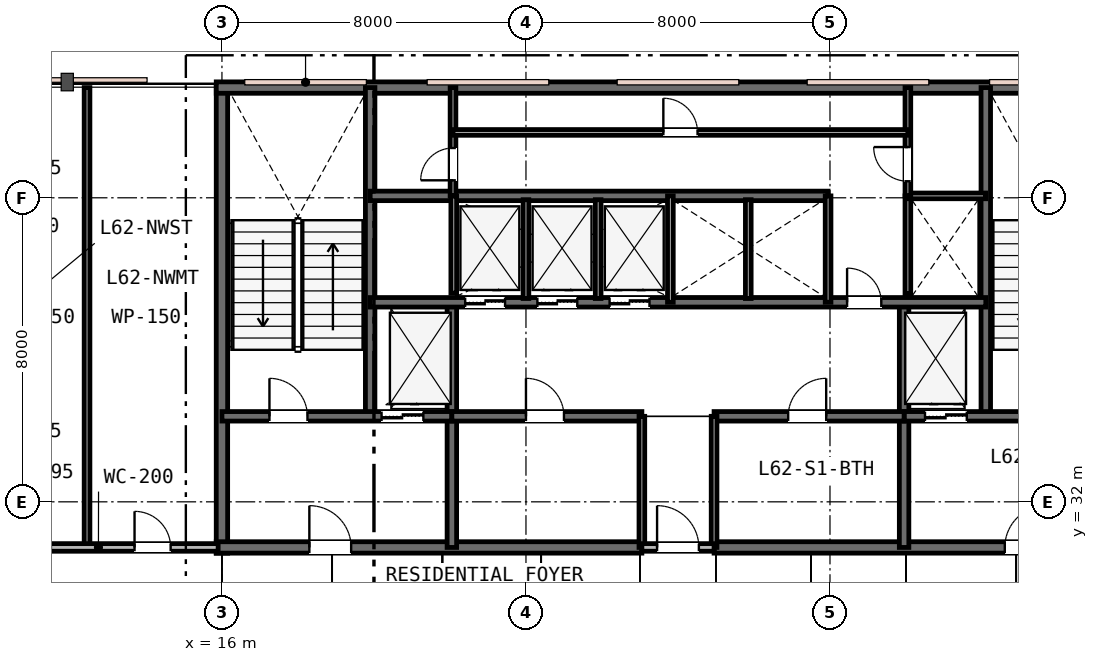
"""IFC4 building model, lengths in metres.
Left out: names, types, materials, properties, quantities, classifications, styles, units other than length and angle.
Written with IfcOpenShell. Run it as: python <this file> out.ifc"""

import sys

from ifc_helpers import new_model, si_unit, direction, frame, frame_2d, origin, place, context, subcontext, project, spatial, rectangle, extrude, element, fill, save


model = new_model("IFC4")
c1 = context("Model", 3, precision=1e-05, world=origin(), true_north=direction((0.0, 1.0)))
c2 = subcontext(c1, "Body", "Model", "MODEL_VIEW")
j1 = project(units=[si_unit("LENGTHUNIT", "METRE"), si_unit("PLANEANGLEUNIT", "RADIAN")], contexts=[c1])
p1 = place(None, origin())
s1 = spatial("IfcSite", under=j1, at=p1, CompositionType="ELEMENT")
p2 = place(p1, origin())
s2 = spatial("IfcBuilding", under=s1, at=p2, CompositionType="ELEMENT")
p3 = place(p2, frame((0.0, 0.0, 241.2)))
s3 = spatial("IfcBuildingStorey", under=s2, at=p3, CompositionType="ELEMENT", Elevation=241.2)
p4 = place(p3, frame((16.0, 30.65, 0.0), z_axis=(0.0, 0.0, 1.0), x_axis=(0.0, 1.0, 0.0)))
e1 = element("IfcWall", 1, at=p4, inside=s3, PredefinedType="SHEAR", context=c2, shape_type="SweptSolid", body=[
    extrude(rectangle(XDim=12.3, YDim=0.3, at=frame_2d((6.15, 0.0))), origin(), (0.0, 0.0, 1.0), 3.8),
])
p5 = place(p3, frame((15.85, 42.9, 0.0), z_axis=(0.0, 0.0, 1.0), x_axis=(1.0, 0.0, 0.0)))
e2 = element("IfcWall", 2, at=p5, inside=s3, PredefinedType="SHEAR", context=c2, shape_type="SweptSolid", body=[
    extrude(rectangle(XDim=24.3, YDim=0.3, at=frame_2d((12.15, 0.0))), origin(), (0.0, 0.0, 1.0), 3.8),
])
p6 = place(p3, frame((15.85, 30.8, 0.0), z_axis=(0.0, 0.0, 1.0), x_axis=(1.0, 0.0, 0.0)))
e3 = element("IfcWall", 3, at=p6, inside=s3, PredefinedType="SHEAR", context=c2, shape_type="SweptSolid", body=[
    extrude(rectangle(XDim=11.2, YDim=0.3, at=frame_2d((5.6, 0.0))), origin(), (0.0, 0.0, 1.0), 3.8),
])
p7 = place(p6, frame((2.45, 0.0, 0.0)))
e4 = element("IfcOpeningElement", 4, at=p7, cuts=e3, PredefinedType="OPENING", context=c2, shape_type="SweptSolid", body=[
    extrude(rectangle(XDim=1.1, YDim=2.15, at=frame_2d((0.55, 1.075))), frame((0.0, 0.16, 0.0), z_axis=(0.0, -1.0, 0.0), x_axis=(1.0, 0.0, 0.0)), (0.0, 0.0, 1.0), 0.32),
])
p8 = place(p3, frame((28.95, 30.8, 0.0), z_axis=(0.0, 0.0, 1.0), x_axis=(1.0, 0.0, 0.0)))
e5 = element("IfcWall", 5, at=p8, inside=s3, PredefinedType="SHEAR", context=c2, shape_type="SweptSolid", body=[
    extrude(rectangle(XDim=11.2, YDim=0.3, at=frame_2d((5.6, 0.0))), origin(), (0.0, 0.0, 1.0), 3.8),
])
p9 = place(p8, frame((7.65, 0.0, 0.0)))
e6 = element("IfcOpeningElement", 6, at=p9, cuts=e5, PredefinedType="OPENING", context=c2, shape_type="SweptSolid", body=[
    extrude(rectangle(XDim=1.1, YDim=2.15, at=frame_2d((0.55, 1.075))), frame((0.0, 0.16, 0.0), z_axis=(0.0, -1.0, 0.0), x_axis=(1.0, 0.0, 0.0)), (0.0, 0.0, 1.0), 0.32),
])
for number, where, z_axis, x_axis in (
    (7, (19.9, 34.25, 0.0), (0.0, 0.0, 1.0), (0.0, 1.0, 0.0)),
    (8, (36.1, 34.25, 0.0), (0.0, 0.0, 1.0), (0.0, 1.0, 0.0)),
):
    element("IfcWall", number, at=place(p3, frame(where, z_axis=z_axis, x_axis=x_axis)), inside=s3, PredefinedType="SHEAR", context=c2, shape_type="SweptSolid", body=[
        extrude(rectangle(XDim=8.65, YDim=0.25, at=frame_2d((4.325, 0.0))), origin(), (0.0, 0.0, 1.0), 3.8),
    ])
for number, where, z_axis, x_axis in (
    (9, (22.05, 30.8, 0.0), (0.0, 0.0, 1.0), (0.0, 1.0, 0.0)),
    (10, (33.95, 30.8, 0.0), (0.0, 0.0, 1.0), (0.0, 1.0, 0.0)),
):
    element("IfcWall", number, at=place(p3, frame(where, z_axis=z_axis, x_axis=x_axis)), inside=s3, PredefinedType="SHEAR", context=c2, shape_type="SweptSolid", body=[
        extrude(rectangle(XDim=6.45, YDim=0.25, at=frame_2d((3.225, 0.0))), origin(), (0.0, 0.0, 1.0), 3.8),
    ])
p10 = place(p3, frame((16.0, 34.25, 0.0), z_axis=(0.0, 0.0, 1.0), x_axis=(1.0, 0.0, 0.0)))
e11 = element("IfcWall", 11, at=p10, inside=s3, PredefinedType="SHEAR", context=c2, shape_type="SweptSolid", body=[
    extrude(rectangle(XDim=6.05, YDim=0.25, at=frame_2d((3.025, 0.0))), origin(), (0.0, 0.0, 1.0), 3.8),
])
p11 = place(p10, frame((1.25, 0.0, 0.0)))
e12 = element("IfcOpeningElement", 12, at=p11, cuts=e11, PredefinedType="OPENING", context=c2, shape_type="SweptSolid", body=[
    extrude(rectangle(XDim=1.0, YDim=2.15, at=frame_2d((0.5, 1.075))), frame((0.0, 0.135, 0.0), z_axis=(0.0, -1.0, 0.0), x_axis=(1.0, 0.0, 0.0)), (0.0, 0.0, 1.0), 0.27),
])
p12 = place(p10, frame((4.2, 0.0, 0.0)))
e13 = element("IfcOpeningElement", 13, at=p12, cuts=e11, PredefinedType="OPENING", context=c2, shape_type="SweptSolid", body=[
    extrude(rectangle(XDim=1.1, YDim=2.15, at=frame_2d((0.55, 1.075))), frame((0.0, 0.135, 0.0), z_axis=(0.0, -1.0, 0.0), x_axis=(1.0, 0.0, 0.0)), (0.0, 0.0, 1.0), 0.27),
])
p13 = place(p3, frame((33.95, 34.25, 0.0), z_axis=(0.0, 0.0, 1.0), x_axis=(1.0, 0.0, 0.0)))
e14 = element("IfcWall", 14, at=p13, inside=s3, PredefinedType="SHEAR", context=c2, shape_type="SweptSolid", body=[
    extrude(rectangle(XDim=6.05, YDim=0.25, at=frame_2d((3.025, 0.0))), origin(), (0.0, 0.0, 1.0), 3.8),
])
p14 = place(p13, frame((3.7, 0.0, 0.0)))
e15 = element("IfcOpeningElement", 15, at=p14, cuts=e14, PredefinedType="OPENING", context=c2, shape_type="SweptSolid", body=[
    extrude(rectangle(XDim=1.0, YDim=2.15, at=frame_2d((0.5, 1.075))), frame((0.0, 0.135, 0.0), z_axis=(0.0, -1.0, 0.0), x_axis=(1.0, 0.0, 0.0)), (0.0, 0.0, 1.0), 0.27),
])
p15 = place(p13, frame((0.55, 0.0, 0.0)))
e16 = element("IfcOpeningElement", 16, at=p15, cuts=e14, PredefinedType="OPENING", context=c2, shape_type="SweptSolid", body=[
    extrude(rectangle(XDim=1.1, YDim=2.15, at=frame_2d((0.55, 1.075))), frame((0.0, 0.135, 0.0), z_axis=(0.0, -1.0, 0.0), x_axis=(1.0, 0.0, 0.0)), (0.0, 0.0, 1.0), 0.27),
])
p16 = place(p3, frame((22.05, 34.25, 0.0), z_axis=(0.0, 0.0, 1.0), x_axis=(1.0, 0.0, 0.0)))
e17 = element("IfcWall", 17, at=p16, inside=s3, PredefinedType="SHEAR", context=c2, shape_type="SweptSolid", body=[
    extrude(rectangle(XDim=5.0, YDim=0.25, at=frame_2d((2.5, 0.0))), origin(), (0.0, 0.0, 1.0), 3.8),
])
p17 = place(p16, frame((1.95, 0.0, 0.0)))
e18 = element("IfcOpeningElement", 18, at=p17, cuts=e17, PredefinedType="OPENING", context=c2, shape_type="SweptSolid", body=[
    extrude(rectangle(XDim=1.0, YDim=2.15, at=frame_2d((0.5, 1.075))), frame((0.0, 0.135, 0.0), z_axis=(0.0, -1.0, 0.0), x_axis=(1.0, 0.0, 0.0)), (0.0, 0.0, 1.0), 0.27),
])
p18 = place(p3, frame((28.95, 34.25, 0.0), z_axis=(0.0, 0.0, 1.0), x_axis=(1.0, 0.0, 0.0)))
e19 = element("IfcWall", 19, at=p18, inside=s3, PredefinedType="SHEAR", context=c2, shape_type="SweptSolid", body=[
    extrude(rectangle(XDim=5.0, YDim=0.25, at=frame_2d((2.5, 0.0))), origin(), (0.0, 0.0, 1.0), 3.8),
])
p19 = place(p18, frame((1.95, 0.0, 0.0)))
e20 = element("IfcOpeningElement", 20, at=p19, cuts=e19, PredefinedType="OPENING", context=c2, shape_type="SweptSolid", body=[
    extrude(rectangle(XDim=1.0, YDim=2.15, at=frame_2d((0.5, 1.075))), frame((0.0, 0.135, 0.0), z_axis=(0.0, -1.0, 0.0), x_axis=(1.0, 0.0, 0.0)), (0.0, 0.0, 1.0), 0.27),
])
p20 = place(p3, frame((19.9, 37.25, 0.0), z_axis=(0.0, 0.0, 1.0), x_axis=(1.0, 0.0, 0.0)))
e21 = element("IfcWall", 21, at=p20, inside=s3, PredefinedType="SHEAR", context=c2, shape_type="SweptSolid", body=[
    extrude(rectangle(XDim=16.2, YDim=0.25, at=frame_2d((8.1, 0.0))), origin(), (0.0, 0.0, 1.0), 3.8),
])
p21 = place(p20, frame((12.55, 0.0, 0.0)))
e22 = element("IfcOpeningElement", 22, at=p21, cuts=e21, PredefinedType="OPENING", context=c2, shape_type="SweptSolid", body=[
    extrude(rectangle(XDim=0.9, YDim=2.15, at=frame_2d((0.45, 1.075))), frame((0.0, 0.135, 0.0), z_axis=(0.0, -1.0, 0.0), x_axis=(1.0, 0.0, 0.0)), (0.0, 0.0, 1.0), 0.27),
])
p22 = place(p20, frame((2.5, 0.0, 0.0)))
e23 = element("IfcOpeningElement", 23, at=p22, cuts=e21, PredefinedType="OPENING", context=c2, shape_type="SweptSolid", body=[
    extrude(rectangle(XDim=1.05, YDim=2.15, at=frame_2d((0.525, 1.075))), frame((0.0, 0.135, 0.0), z_axis=(0.0, -1.0, 0.0), x_axis=(1.0, 0.0, 0.0)), (0.0, 0.0, 1.0), 0.27),
])
p23 = place(p20, frame((4.4, 0.0, 0.0)))
e24 = element("IfcOpeningElement", 24, at=p23, cuts=e21, PredefinedType="OPENING", context=c2, shape_type="SweptSolid", body=[
    extrude(rectangle(XDim=1.05, YDim=2.15, at=frame_2d((0.525, 1.075))), frame((0.0, 0.135, 0.0), z_axis=(0.0, -1.0, 0.0), x_axis=(1.0, 0.0, 0.0)), (0.0, 0.0, 1.0), 0.27),
])
p24 = place(p20, frame((6.3, 0.0, 0.0)))
e25 = element("IfcOpeningElement", 25, at=p24, cuts=e21, PredefinedType="OPENING", context=c2, shape_type="SweptSolid", body=[
    extrude(rectangle(XDim=1.05, YDim=2.15, at=frame_2d((0.525, 1.075))), frame((0.0, 0.135, 0.0), z_axis=(0.0, -1.0, 0.0), x_axis=(1.0, 0.0, 0.0)), (0.0, 0.0, 1.0), 0.27),
])
p25 = place(p3, frame((19.9, 40.05, 0.0), z_axis=(0.0, 0.0, 1.0), x_axis=(1.0, 0.0, 0.0)))
e26 = element("IfcWall", 26, at=p25, inside=s3, PredefinedType="SHEAR", context=c2, shape_type="SweptSolid", body=[
    extrude(rectangle(XDim=12.05, YDim=0.25, at=frame_2d((6.025, 0.0))), origin(), (0.0, 0.0, 1.0), 3.8),
])
for number, where, z_axis, x_axis in (
    (27, (27.05, 30.8, 0.0), (0.0, 0.0, 1.0), (0.0, 1.0, 0.0)),
    (28, (28.95, 30.8, 0.0), (0.0, 0.0, 1.0), (0.0, 1.0, 0.0)),
):
    element("IfcWall", number, at=place(p3, frame(where, z_axis=z_axis, x_axis=x_axis)), inside=s3, PredefinedType="PLUMBINGWALL", context=c2, shape_type="SweptSolid", body=[
        extrude(rectangle(XDim=3.45, YDim=0.15, at=frame_2d((1.725, 0.0))), origin(), (0.0, 0.0, 1.0), 3.28),
    ])
p26 = place(p3, frame((27.05, 30.8, 0.0), z_axis=(0.0, 0.0, 1.0), x_axis=(1.0, 0.0, 0.0)))
e29 = element("IfcWall", 29, at=p26, inside=s3, PredefinedType="PARTITIONING", context=c2, shape_type="SweptSolid", body=[
    extrude(rectangle(XDim=1.9, YDim=0.2, at=frame_2d((0.95, 0.0))), origin(), (0.0, 0.0, 1.0), 3.28),
])
p27 = place(p26, frame((0.4, 0.0, 0.0)))
e30 = element("IfcOpeningElement", 30, at=p27, cuts=e29, PredefinedType="OPENING", context=c2, shape_type="SweptSolid", body=[
    extrude(rectangle(XDim=1.1, YDim=2.15, at=frame_2d((0.55, 1.075))), frame((0.0, 0.11, 0.0), z_axis=(0.0, -1.0, 0.0), x_axis=(1.0, 0.0, 0.0)), (0.0, 0.0, 1.0), 0.22),
])
p28 = place(p3, frame((22.1, 37.49, 0.0), z_axis=(0.0, 0.0, 1.0), x_axis=(0.0, 1.0, 0.0)))
e31 = element("IfcWall", 31, at=p28, inside=s3, PredefinedType="PLUMBINGWALL", context=c2, shape_type="SweptSolid", body=[
    extrude(rectangle(XDim=2.56, YDim=0.15, at=frame_2d((1.28, 0.0))), origin(), (0.0, 0.0, 1.0), 3.53),
])
p29 = place(p3, frame((27.8, 37.25, 0.0), z_axis=(0.0, 0.0, 1.0), x_axis=(0.0, 1.0, 0.0)))
e32 = element("IfcWall", 32, at=p29, inside=s3, PredefinedType="PLUMBINGWALL", context=c2, shape_type="SweptSolid", body=[
    extrude(rectangle(XDim=2.8, YDim=0.15, at=frame_2d((1.4, 0.0))), origin(), (0.0, 0.0, 1.0), 3.53),
])
for number, where, z_axis, x_axis in (
    (33, (24.0, 37.35, 0.0), (0.0, 0.0, 1.0), (0.0, 1.0, 0.0)),
    (34, (25.9, 37.35, 0.0), (0.0, 0.0, 1.0), (0.0, 1.0, 0.0)),
):
    element("IfcWall", number, at=place(p3, frame(where, z_axis=z_axis, x_axis=x_axis)), inside=s3, PredefinedType="PLUMBINGWALL", context=c2, shape_type="SweptSolid", body=[
        extrude(rectangle(XDim=2.6, YDim=0.15, at=frame_2d((1.3, 0.0))), origin(), (0.0, 0.0, 1.0), 3.53),
    ])
p30 = place(p3, frame((31.95, 37.25, 0.0), z_axis=(0.0, 0.0, 1.0), x_axis=(0.0, 1.0, 0.0)))
e35 = element("IfcWall", 35, at=p30, inside=s3, PredefinedType="PLUMBINGWALL", context=c2, shape_type="SweptSolid", body=[
    extrude(rectangle(XDim=2.8, YDim=0.15, at=frame_2d((1.4, 0.0))), origin(), (0.0, 0.0, 1.0), 3.53),
])
p31 = place(p3, frame((29.85, 37.35, 0.0), z_axis=(0.0, 0.0, 1.0), x_axis=(0.0, 1.0, 0.0)))
e36 = element("IfcWall", 36, at=p31, inside=s3, PredefinedType="PLUMBINGWALL", context=c2, shape_type="SweptSolid", body=[
    extrude(rectangle(XDim=2.6, YDim=0.15, at=frame_2d((1.3, 0.0))), origin(), (0.0, 0.0, 1.0), 3.53),
])
p32 = place(p3, frame((34.05, 37.473, 0.0), z_axis=(0.0, 0.0, 1.0), x_axis=(0.0, 1.0, 0.0)))
e37 = element("IfcWall", 37, at=p32, inside=s3, PredefinedType="PLUMBINGWALL", context=c2, shape_type="SweptSolid", body=[
    extrude(rectangle(XDim=2.577, YDim=0.15, at=frame_2d((1.288, 0.0))), origin(), (0.0, 0.0, 1.0), 3.53),
])
p33 = place(p3, frame((34.05, 40.05, 0.0), z_axis=(0.0, 0.0, 1.0), x_axis=(1.0, 0.0, 0.0)))
e38 = element("IfcWall", 38, at=p33, inside=s3, PredefinedType="PARTITIONING", context=c2, shape_type="SweptSolid", body=[
    extrude(rectangle(XDim=2.05, YDim=0.15, at=frame_2d((1.025, 0.0))), origin(), (0.0, 0.0, 1.0), 3.53),
])
p34 = place(p3, frame((34.05, 40.05, 0.0), z_axis=(0.0, 0.0, 1.0), x_axis=(0.0, 1.0, 0.0)))
e39 = element("IfcWall", 39, at=p34, inside=s3, PredefinedType="PARTITIONING", context=c2, shape_type="SweptSolid", body=[
    extrude(rectangle(XDim=2.85, YDim=0.15, at=frame_2d((1.425, 0.0))), origin(), (0.0, 0.0, 1.0), 3.53),
])
p35 = place(p34, frame((0.385, 0.0, 0.0)))
e40 = element("IfcOpeningElement", 40, at=p35, cuts=e39, PredefinedType="OPENING", context=c2, shape_type="SweptSolid", body=[
    extrude(rectangle(XDim=0.9, YDim=2.15, at=frame_2d((0.45, 1.075))), frame((0.0, 0.085, 0.0), z_axis=(0.0, -1.0, 0.0), x_axis=(1.0, 0.0, 0.0)), (0.0, 0.0, 1.0), 0.17),
])
p36 = place(p3, frame((22.08, 40.05, 0.0), z_axis=(0.0, 0.0, 1.0), x_axis=(0.0, 1.0, 0.0)))
e41 = element("IfcWall", 41, at=p36, inside=s3, PredefinedType="PARTITIONING", context=c2, shape_type="SweptSolid", body=[
    extrude(rectangle(XDim=2.85, YDim=0.15, at=frame_2d((1.425, 0.0))), origin(), (0.0, 0.0, 1.0), 3.53),
])
p37 = place(p36, frame((0.41, 0.0, 0.0)))
e42 = element("IfcOpeningElement", 42, at=p37, cuts=e41, PredefinedType="OPENING", context=c2, shape_type="SweptSolid", body=[
    extrude(rectangle(XDim=0.85, YDim=2.15, at=frame_2d((0.425, 1.075))), frame((0.0, 0.085, 0.0), z_axis=(0.0, -1.0, 0.0), x_axis=(1.0, 0.0, 0.0)), (0.0, 0.0, 1.0), 0.17),
])
p38 = place(p3, frame((22.08, 41.72, 0.0), z_axis=(0.0, 0.0, 1.0), x_axis=(1.0, 0.0, 0.0)))
e43 = element("IfcWall", 43, at=p38, inside=s3, PredefinedType="PARTITIONING", context=c2, shape_type="SweptSolid", body=[
    extrude(rectangle(XDim=11.97, YDim=0.15, at=frame_2d((5.985, 0.0))), origin(), (0.0, 0.0, 1.0), 3.53),
])
p39 = place(p38, frame((5.535, 0.0, 0.0)))
e44 = element("IfcOpeningElement", 44, at=p39, cuts=e43, PredefinedType="OPENING", context=c2, shape_type="SweptSolid", body=[
    extrude(rectangle(XDim=0.9, YDim=2.15, at=frame_2d((0.45, 1.075))), frame((0.0, 0.085, 0.0), z_axis=(0.0, -1.0, 0.0), x_axis=(1.0, 0.0, 0.0)), (0.0, 0.0, 1.0), 0.17),
])
p40 = place(p3, frame((12.45, 30.8, 0.0), z_axis=(0.0, 0.0, 1.0), x_axis=(0.0, 1.0, 0.0)))
e45 = element("IfcWall", 45, at=p40, inside=s3, PredefinedType="PARTITIONING", context=c2, shape_type="SweptSolid", body=[
    extrude(rectangle(XDim=12.1, YDim=0.15, at=frame_2d((6.05, 0.0))), origin(), (0.0, 0.0, 1.0), 3.16),
])
p41 = place(p3, frame((9.6, 30.8, 0.0), z_axis=(0.0, 0.0, 1.0), x_axis=(1.0, 0.0, 0.0)))
e46 = element("IfcWall", 46, at=p41, inside=s3, PredefinedType="PARTITIONING", context=c2, shape_type="SweptSolid", body=[
    extrude(rectangle(XDim=6.3, YDim=0.2, at=frame_2d((3.15, 0.0))), origin(), (0.0, 0.0, 1.0), 3.16),
])
p42 = place(p41, frame((0.95, 0.0, 0.0)))
e47 = element("IfcOpeningElement", 47, at=p42, cuts=e46, PredefinedType="OPENING", context=c2, shape_type="SweptSolid", body=[
    extrude(rectangle(XDim=0.95, YDim=2.15, at=frame_2d((0.475, 1.075))), frame((0.0, 0.11, 0.0), z_axis=(0.0, -1.0, 0.0), x_axis=(1.0, 0.0, 0.0)), (0.0, 0.0, 1.0), 0.22),
])
p43 = place(p41, frame((4.1, 0.0, 0.0)))
e48 = element("IfcOpeningElement", 48, at=p43, cuts=e46, PredefinedType="OPENING", context=c2, shape_type="SweptSolid", body=[
    extrude(rectangle(XDim=0.95, YDim=2.15, at=frame_2d((0.475, 1.075))), frame((0.0, 0.11, 0.0), z_axis=(0.0, -1.0, 0.0), x_axis=(1.0, 0.0, 0.0)), (0.0, 0.0, 1.0), 0.22),
])
p44 = place(p27, origin())
e49 = element("IfcDoor", 49, at=p44, inside=s3, OperationType="SINGLE_SWING_LEFT", PredefinedType="DOOR", context=c2, shape_type="SweptSolid", body=[
    extrude(rectangle(XDim=1.1, YDim=2.15, at=frame_2d((0.55, 1.075))), frame((0.0, 0.025, 0.0), z_axis=(0.0, -1.0, 0.0), x_axis=(1.0, 0.0, 0.0)), (0.0, 0.0, 1.0), 0.05),
])
fill(e30, e49)
p45 = place(p11, origin())
e50 = element("IfcDoor", 50, at=p45, inside=s3, OperationType="SINGLE_SWING_LEFT", PredefinedType="DOOR", context=c2, shape_type="SweptSolid", body=[
    extrude(rectangle(XDim=1.0, YDim=2.15, at=frame_2d((0.5, 1.075))), frame((0.0, 0.025, 0.0), z_axis=(0.0, -1.0, 0.0), x_axis=(1.0, 0.0, 0.0)), (0.0, 0.0, 1.0), 0.05),
])
fill(e12, e50)
p46 = place(p7, origin())
e51 = element("IfcDoor", 51, at=p46, inside=s3, OperationType="SINGLE_SWING_LEFT", PredefinedType="DOOR", context=c2, shape_type="SweptSolid", body=[
    extrude(rectangle(XDim=1.1, YDim=2.15, at=frame_2d((0.55, 1.075))), frame((0.0, 0.025, 0.0), z_axis=(0.0, -1.0, 0.0), x_axis=(1.0, 0.0, 0.0)), (0.0, 0.0, 1.0), 0.05),
])
fill(e4, e51)
p47 = place(p9, origin())
e52 = element("IfcDoor", 52, at=p47, inside=s3, OperationType="SINGLE_SWING_RIGHT", PredefinedType="DOOR", context=c2, shape_type="SweptSolid", body=[
    extrude(rectangle(XDim=1.1, YDim=2.15, at=frame_2d((0.55, 1.075))), frame((0.0, 0.025, 0.0), z_axis=(0.0, -1.0, 0.0), x_axis=(1.0, 0.0, 0.0)), (0.0, 0.0, 1.0), 0.05),
])
fill(e6, e52)
p48 = place(p17, origin())
e53 = element("IfcDoor", 53, at=p48, inside=s3, OperationType="SINGLE_SWING_LEFT", PredefinedType="DOOR", context=c2, shape_type="SweptSolid", body=[
    extrude(rectangle(XDim=1.0, YDim=2.15, at=frame_2d((0.5, 1.075))), frame((0.0, 0.025, 0.0), z_axis=(0.0, -1.0, 0.0), x_axis=(1.0, 0.0, 0.0)), (0.0, 0.0, 1.0), 0.05),
])
fill(e18, e53)
p49 = place(p19, origin())
e54 = element("IfcDoor", 54, at=p49, inside=s3, OperationType="SINGLE_SWING_RIGHT", PredefinedType="DOOR", context=c2, shape_type="SweptSolid", body=[
    extrude(rectangle(XDim=1.0, YDim=2.15, at=frame_2d((0.5, 1.075))), frame((0.0, 0.025, 0.0), z_axis=(0.0, -1.0, 0.0), x_axis=(1.0, 0.0, 0.0)), (0.0, 0.0, 1.0), 0.05),
])
fill(e20, e54)
p50 = place(p21, origin())
e55 = element("IfcDoor", 55, at=p50, inside=s3, OperationType="SINGLE_SWING_LEFT", PredefinedType="DOOR", context=c2, shape_type="SweptSolid", body=[
    extrude(rectangle(XDim=0.9, YDim=2.15, at=frame_2d((0.45, 1.075))), frame((0.0, 0.025, 0.0), z_axis=(0.0, -1.0, 0.0), x_axis=(1.0, 0.0, 0.0)), (0.0, 0.0, 1.0), 0.05),
])
fill(e22, e55)
p51 = place(p35, origin())
e56 = element("IfcDoor", 56, at=p51, inside=s3, OperationType="SINGLE_SWING_RIGHT", PredefinedType="DOOR", context=c2, shape_type="SweptSolid", body=[
    extrude(rectangle(XDim=0.9, YDim=2.15, at=frame_2d((0.45, 1.075))), frame((0.0, 0.025, 0.0), z_axis=(0.0, -1.0, 0.0), x_axis=(1.0, 0.0, 0.0)), (0.0, 0.0, 1.0), 0.05),
])
fill(e40, e56)
p52 = place(p37, origin())
e57 = element("IfcDoor", 57, at=p52, inside=s3, OperationType="SINGLE_SWING_LEFT", PredefinedType="DOOR", context=c2, shape_type="SweptSolid", body=[
    extrude(rectangle(XDim=0.85, YDim=2.15, at=frame_2d((0.425, 1.075))), frame((0.0, 0.025, 0.0), z_axis=(0.0, -1.0, 0.0), x_axis=(1.0, 0.0, 0.0)), (0.0, 0.0, 1.0), 0.05),
])
fill(e42, e57)
p53 = place(p39, origin())
e58 = element("IfcDoor", 58, at=p53, inside=s3, OperationType="SINGLE_SWING_LEFT", PredefinedType="DOOR", context=c2, shape_type="SweptSolid", body=[
    extrude(rectangle(XDim=0.9, YDim=2.15, at=frame_2d((0.45, 1.075))), frame((0.0, 0.025, 0.0), z_axis=(0.0, -1.0, 0.0), x_axis=(1.0, 0.0, 0.0)), (0.0, 0.0, 1.0), 0.05),
])
fill(e44, e58)
p54 = place(p43, origin())
e59 = element("IfcDoor", 59, at=p54, inside=s3, OperationType="SINGLE_SWING_LEFT", PredefinedType="DOOR", context=c2, shape_type="SweptSolid", body=[
    extrude(rectangle(XDim=0.95, YDim=2.15, at=frame_2d((0.475, 1.075))), frame((0.0, 0.025, 0.0), z_axis=(0.0, -1.0, 0.0), x_axis=(1.0, 0.0, 0.0)), (0.0, 0.0, 1.0), 0.05),
])
fill(e48, e59)
p55 = place(p12, origin())
e60 = element("IfcDoor", 60, at=p55, inside=s3, OperationType="DOUBLE_DOOR_SLIDING", PredefinedType="DOOR", context=c2, shape_type="SweptSolid", body=[
    extrude(rectangle(XDim=1.1, YDim=2.15, at=frame_2d((0.55, 1.075))), frame((0.0, 0.025, 0.0), z_axis=(0.0, -1.0, 0.0), x_axis=(1.0, 0.0, 0.0)), (0.0, 0.0, 1.0), 0.05),
])
fill(e13, e60)
p56 = place(p15, origin())
e61 = element("IfcDoor", 61, at=p56, inside=s3, OperationType="DOUBLE_DOOR_SLIDING", PredefinedType="DOOR", context=c2, shape_type="SweptSolid", body=[
    extrude(rectangle(XDim=1.1, YDim=2.15, at=frame_2d((0.55, 1.075))), frame((0.0, 0.025, 0.0), z_axis=(0.0, -1.0, 0.0), x_axis=(1.0, 0.0, 0.0)), (0.0, 0.0, 1.0), 0.05),
])
fill(e16, e61)
p57 = place(p22, origin())
e62 = element("IfcDoor", 62, at=p57, inside=s3, OperationType="DOUBLE_DOOR_SLIDING", PredefinedType="DOOR", context=c2, shape_type="SweptSolid", body=[
    extrude(rectangle(XDim=1.05, YDim=2.15, at=frame_2d((0.525, 1.075))), frame((0.0, 0.025, 0.0), z_axis=(0.0, -1.0, 0.0), x_axis=(1.0, 0.0, 0.0)), (0.0, 0.0, 1.0), 0.05),
])
fill(e23, e62)
p58 = place(p23, origin())
e63 = element("IfcDoor", 63, at=p58, inside=s3, OperationType="DOUBLE_DOOR_SLIDING", PredefinedType="DOOR", context=c2, shape_type="SweptSolid", body=[
    extrude(rectangle(XDim=1.05, YDim=2.15, at=frame_2d((0.525, 1.075))), frame((0.0, 0.025, 0.0), z_axis=(0.0, -1.0, 0.0), x_axis=(1.0, 0.0, 0.0)), (0.0, 0.0, 1.0), 0.05),
])
fill(e24, e63)
p59 = place(p24, origin())
e64 = element("IfcDoor", 64, at=p59, inside=s3, OperationType="DOUBLE_DOOR_SLIDING", PredefinedType="DOOR", context=c2, shape_type="SweptSolid", body=[
    extrude(rectangle(XDim=1.05, YDim=2.15, at=frame_2d((0.525, 1.075))), frame((0.0, 0.025, 0.0), z_axis=(0.0, -1.0, 0.0), x_axis=(1.0, 0.0, 0.0)), (0.0, 0.0, 1.0), 0.05),
])
fill(e25, e64)
save(model, sys.argv[1])
